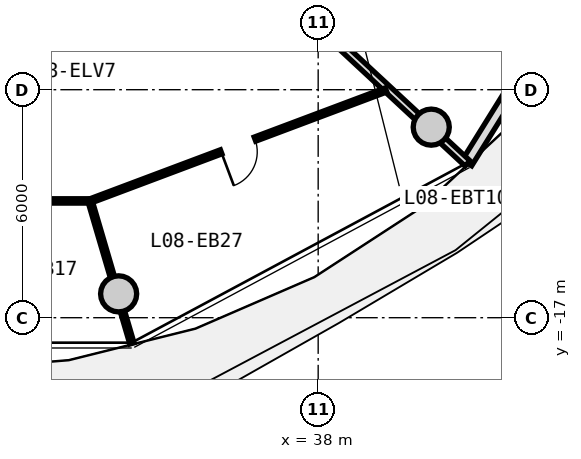
"""IFC4 building model, lengths in metres.
Left out: names, types, materials, properties, quantities, classifications, styles, units other than length and angle.
Written with IfcOpenShell. Run it as: python <this file> out.ifc"""

import sys

from ifc_helpers import new_model, si_unit, direction, frame, frame_2d, origin, origin_2d, place, context, subcontext, project, spatial, rectangle, circle, extrude, source, transform, mapped, element, fill, save


model = new_model("IFC4")
c1 = context("Model", 3, precision=1e-05, world=origin(), true_north=direction((0.0, 1.0)))
c2 = subcontext(c1, "Body", "Model", "MODEL_VIEW")
j1 = project(units=[si_unit("LENGTHUNIT", "METRE"), si_unit("PLANEANGLEUNIT", "RADIAN")], contexts=[c1])
p1 = place(None, origin())
s1 = spatial("IfcSite", under=j1, at=p1, CompositionType="ELEMENT")
p2 = place(p1, origin())
s2 = spatial("IfcBuilding", under=s1, at=p2, CompositionType="ELEMENT")
p3 = place(p2, frame((0.0, 0.0, 30.75)))
s3 = spatial("IfcBuildingStorey", under=s2, at=p3, CompositionType="ELEMENT", Elevation=30.75)
m1 = source(origin(), c2, "Body", "SweptSolid", [
    extrude(circle(Radius=0.475, at=origin_2d()), origin(), (0.0, 0.0, 1.0), 3.05),
])
for number, where, z_axis, x_axis in (
    (1, (32.749, -16.373, 0.0), (0.0, 0.0, 1.0), (1.0, 0.0, 0.0)),
    (2, (40.975, -11.985, 0.0), (0.0, 0.0, 1.0), (1.0, 0.0, 0.0)),
):
    element("IfcColumn", number, at=place(p3, frame(where, z_axis=z_axis, x_axis=x_axis)), inside=s3, PredefinedType="COLUMN", context=c2, shape_type="MappedRepresentation", body=[
        mapped(m1, transform((0.0, 0.0, 0.0), x_axis=(1.0, 0.0, 0.0), y_axis=(0.0, 1.0, 0.0), z_axis=(0.0, 0.0, 1.0), scale=1.0)),
    ])
m2 = source(origin(), c2, "Body", "SweptSolid", [
    extrude(rectangle(XDim=9.649, YDim=0.29, at=frame_2d((4.824, 0.0))), origin(), (0.0, 0.0, 1.0), 2.79),
])
p4 = place(p3, frame((47.01, -4.731, 0.0), z_axis=(0.0, 0.0, 1.0), x_axis=(-0.527909458386, -0.849300655684, 0.0)))
e3 = element("IfcWall", 3, at=p4, inside=s3, PredefinedType="SOLIDWALL", context=c2, shape_type="MappedRepresentation", body=[
    mapped(m2, transform((0.0, 0.0, 0.0), x_axis=(1.0, 0.0, 0.0), y_axis=(0.0, 1.0, 0.0), z_axis=(0.0, 0.0, 1.0), scale=1.0)),
])
p5 = place(p4, frame((1.06, 0.0, 0.0)))
e4 = element("IfcOpeningElement", 4, at=p5, cuts=e3, PredefinedType="OPENING", context=c2, shape_type="SweptSolid", body=[
    extrude(rectangle(XDim=1.15, YDim=2.25, at=frame_2d((0.575, 1.125))), frame((0.0, 0.155, 0.0), z_axis=(0.0, -1.0, 0.0), x_axis=(1.0, 0.0, 0.0)), (0.0, 0.0, 1.0), 0.31),
])
p6 = place(p4, frame((5.354, 0.0, 0.85)))
e5 = element("IfcOpeningElement", 5, at=p6, cuts=e3, PredefinedType="OPENING", context=c2, shape_type="SweptSolid", body=[
    extrude(rectangle(XDim=1.2, YDim=1.5, at=frame_2d((0.6, 0.75))), frame((0.0, 0.155, 0.0), z_axis=(0.0, -1.0, 0.0), x_axis=(1.0, 0.0, 0.0)), (0.0, 0.0, 1.0), 0.31),
])
m3 = source(origin(), c2, "Body", "SweptSolid", [
    extrude(rectangle(XDim=7.435, YDim=0.19, at=frame_2d((3.717, 0.0))), origin(), (0.0, 0.0, 1.0), 2.415),
])
p7 = place(p3, frame((36.483, -7.88, 0.0), z_axis=(0.0, 0.0, 1.0), x_axis=(0.732651956848, -0.680603489652, 0.0)))
e6 = element("IfcWall", 6, at=p7, inside=s3, PredefinedType="PARTITIONING", context=c2, shape_type="MappedRepresentation", body=[
    mapped(m3, transform((0.0, 0.0, 0.0), x_axis=(1.0, 0.0, 0.0), y_axis=(0.0, 1.0, 0.0), z_axis=(0.0, 0.0, 1.0), scale=1.0)),
])
m4 = source(origin(), c2, "Body", "SweptSolid", [
    extrude(rectangle(XDim=7.993, YDim=0.115, at=frame_2d((3.996, 0.0))), origin(), (0.0, 0.0, 1.0), 2.775),
])
p8 = place(p3, frame((24.004, -13.927, 0.0), z_axis=(0.0, 0.0, 1.0), x_axis=(1.0, 0.0, 0.0)))
e7 = element("IfcWall", 7, at=p8, inside=s3, PredefinedType="PARTITIONING", context=c2, shape_type="MappedRepresentation", body=[
    mapped(m4, transform((0.0, 0.0, 0.0), x_axis=(1.0, 0.0, 0.0), y_axis=(0.0, 1.0, 0.0), z_axis=(0.0, 0.0, 1.0), scale=1.0)),
])
p9 = place(p8, frame((3.521, 0.0, 0.0)))
e8 = element("IfcOpeningElement", 8, at=p9, cuts=e7, PredefinedType="OPENING", context=c2, shape_type="SweptSolid", body=[
    extrude(rectangle(XDim=0.95, YDim=2.1, at=frame_2d((0.475, 1.05))), frame((0.0, 0.067, 0.0), z_axis=(0.0, -1.0, 0.0), x_axis=(1.0, 0.0, 0.0)), (0.0, 0.0, 1.0), 0.135),
])
m5 = source(origin(), c2, "Body", "SweptSolid", [
    extrude(rectangle(XDim=8.32, YDim=0.115, at=frame_2d((4.16, 0.0))), origin(), (0.0, 0.0, 1.0), 2.775),
])
p10 = place(p3, frame((31.997, -13.93, 0.0), z_axis=(0.0, 0.0, 1.0), x_axis=(0.936180763098, 0.351518959382, 0.0)))
e9 = element("IfcWall", 9, at=p10, inside=s3, PredefinedType="PARTITIONING", context=c2, shape_type="MappedRepresentation", body=[
    mapped(m5, transform((0.0, 0.0, 0.0), x_axis=(1.0, 0.0, 0.0), y_axis=(0.0, 1.0, 0.0), z_axis=(0.0, 0.0, 1.0), scale=1.0)),
])
p11 = place(p10, frame((3.685, 0.0, 0.0)))
e10 = element("IfcOpeningElement", 10, at=p11, cuts=e9, PredefinedType="OPENING", context=c2, shape_type="SweptSolid", body=[
    extrude(rectangle(XDim=0.95, YDim=2.1, at=frame_2d((0.475, 1.05))), frame((0.0, 0.067, 0.0), z_axis=(0.0, -1.0, 0.0), x_axis=(1.0, 0.0, 0.0)), (0.0, 0.0, 1.0), 0.135),
])
m6 = source(origin(), c2, "Body", "SweptSolid", [
    extrude(rectangle(XDim=3.905, YDim=0.115, at=frame_2d((1.952, 0.0))), origin(), (0.0, 0.0, 1.0), 2.225),
])
p12 = place(p3, frame((31.997, -13.93, 0.0), z_axis=(0.0, 0.0, 1.0), x_axis=(0.282037692958, -0.959403324859, 0.0)))
e11 = element("IfcWall", 11, at=p12, inside=s3, PredefinedType="PARTITIONING", context=c2, shape_type="MappedRepresentation", body=[
    mapped(m6, transform((0.0, 0.0, 0.0), x_axis=(1.0, 0.0, 0.0), y_axis=(0.0, 1.0, 0.0), z_axis=(0.0, 0.0, 1.0), scale=1.0)),
])
m7 = source(origin(), c2, "Body", "SweptSolid", [
    extrude(rectangle(XDim=0.95, YDim=2.1, at=frame_2d((0.475, 1.05))), frame((0.0, 0.025, 0.0), z_axis=(0.0, -1.0, 0.0), x_axis=(1.0, 0.0, 0.0)), (0.0, 0.0, 1.0), 0.05),
])
p13 = place(p11, frame((0.95, 0.0, 0.0), z_axis=(0.0, 0.0, 1.0), x_axis=(-1.0, 0.0, 0.0)))
e12 = element("IfcDoor", 12, at=p13, inside=s3, OperationType="SINGLE_SWING_RIGHT", PredefinedType="DOOR", context=c2, shape_type="MappedRepresentation", body=[
    mapped(m7, transform((0.0, 0.0, 0.0), x_axis=(1.0, 0.0, 0.0), y_axis=(0.0, 1.0, 0.0), z_axis=(0.0, 0.0, 1.0), scale=1.0)),
])
fill(e10, e12)
save(model, sys.argv[1])
